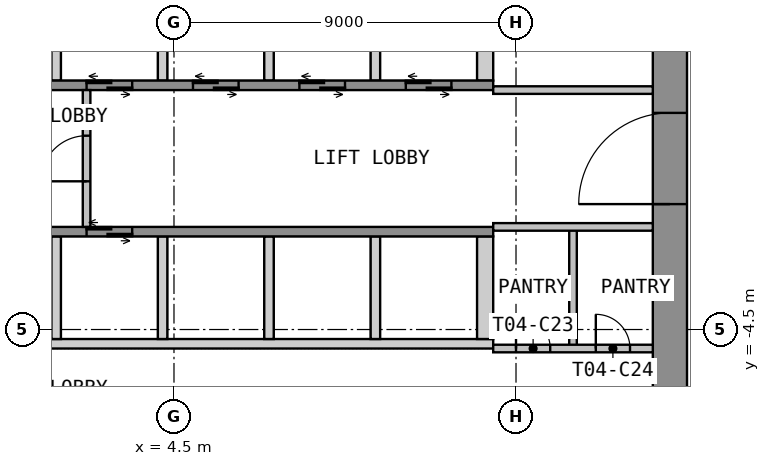
"""IFC4 building model, lengths in metres.
Left out: names, types, materials, properties, quantities, classifications, styles, units other than length and angle.
Written with IfcOpenShell. Run it as: python <this file> out.ifc"""

import sys

from ifc_helpers import new_model, si_unit, direction, frame, frame_2d, origin, place, context, subcontext, project, spatial, polyline, rectangle, outline, extrude, element, fill, save


model = new_model("IFC4")
c1 = context("Model", 3, precision=1e-05, world=origin(), true_north=direction((0.0, 1.0)))
c2 = subcontext(c1, "Body", "Model", "MODEL_VIEW")
j1 = project(units=[si_unit("LENGTHUNIT", "METRE"), si_unit("PLANEANGLEUNIT", "RADIAN")], contexts=[c1])
p1 = place(None, origin())
s1 = spatial("IfcSite", under=j1, at=p1, CompositionType="ELEMENT")
p2 = place(p1, origin())
s2 = spatial("IfcBuilding", under=s1, at=p2, CompositionType="ELEMENT")
p3 = place(p2, frame((0.0, 0.0, 65.1)))
s3 = spatial("IfcBuildingStorey", under=s2, at=p3, CompositionType="ELEMENT", Elevation=65.1)
p4 = place(p3, frame((17.55, -12.6, 0.0), z_axis=(0.0, 0.0, 1.0), x_axis=(0.0, 1.0, 0.0)))
e1 = element("IfcWall", 1, at=p4, inside=s3, PredefinedType="SHEAR", context=c2, shape_type="SweptSolid", body=[
    extrude(rectangle(XDim=25.2, YDim=0.9, at=frame_2d((12.6, 0.0))), origin(), (0.0, 0.0, 1.0), 3.525),
])
p5 = place(p4, frame((11.4, 0.0, 0.0)))
e2 = element("IfcOpeningElement", 2, at=p5, cuts=e1, PredefinedType="OPENING", context=c2, shape_type="SweptSolid", body=[
    extrude(rectangle(XDim=2.4, YDim=2.1, at=frame_2d((1.2, 1.05))), frame((0.0, 0.46, 0.0), z_axis=(0.0, -1.0, 0.0), x_axis=(1.0, 0.0, 0.0)), (0.0, 0.0, 1.0), 0.92),
])
p6 = place(p3, origin())
e3 = element("IfcWall", 3, at=p6, inside=s3, PredefinedType="SHEAR", context=c2, shape_type="SweptSolid", body=[
    extrude(outline(polyline([(1.275, 2.05), (1.525, 2.05), (1.525, 4.75), (1.275, 4.75), (1.275, 2.05)])), origin(), (0.0, 0.0, 1.0), 3.525),
])
p7 = place(p3, origin())
e4 = element("IfcWall", 4, at=p7, inside=s3, PredefinedType="SHEAR", context=c2, shape_type="SweptSolid", body=[
    extrude(outline(polyline([(4.075, 2.05), (4.325, 2.05), (4.325, 4.75), (4.075, 4.75), (4.075, 2.05)])), origin(), (0.0, 0.0, 1.0), 3.525),
])
p8 = place(p3, origin())
e5 = element("IfcWall", 5, at=p8, inside=s3, PredefinedType="SHEAR", context=c2, shape_type="SweptSolid", body=[
    extrude(outline(polyline([(6.875, 2.05), (7.125, 2.05), (7.125, 4.75), (6.875, 4.75), (6.875, 2.05)])), origin(), (0.0, 0.0, 1.0), 3.525),
])
p9 = place(p3, origin())
e6 = element("IfcWall", 6, at=p9, inside=s3, PredefinedType="SHEAR", context=c2, shape_type="SweptSolid", body=[
    extrude(outline(polyline([(9.675, 2.05), (9.925, 2.05), (9.925, 4.75), (9.675, 4.75), (9.675, 2.05)])), origin(), (0.0, 0.0, 1.0), 3.525),
])
p10 = place(p3, origin())
e7 = element("IfcWall", 7, at=p10, inside=s3, PredefinedType="SHEAR", context=c2, shape_type="SweptSolid", body=[
    extrude(outline(polyline([(12.475, 2.05), (12.9, 2.05), (12.9, 4.75), (12.475, 4.75), (12.475, 2.05)])), origin(), (0.0, 0.0, 1.0), 3.525),
])
p11 = place(p3, frame((-12.9, 1.925, 0.0), z_axis=(0.0, 0.0, 1.0), x_axis=(1.0, 0.0, 0.0)))
e8 = element("IfcWall", 8, at=p11, inside=s3, PredefinedType="SHEAR", context=c2, shape_type="SweptSolid", body=[
    extrude(rectangle(XDim=25.8, YDim=0.25, at=frame_2d((12.9, 0.0))), origin(), (0.0, 0.0, 1.0), 3.525),
])
p12 = place(p11, frame((9.5, 0.0, 0.0)))
e9 = element("IfcOpeningElement", 9, at=p12, cuts=e8, PredefinedType="OPENING", context=c2, shape_type="SweptSolid", body=[
    extrude(rectangle(XDim=1.2, YDim=2.1, at=frame_2d((0.6, 1.05))), frame((0.0, 0.135, 0.0), z_axis=(0.0, -1.0, 0.0), x_axis=(1.0, 0.0, 0.0)), (0.0, 0.0, 1.0), 0.27),
])
p13 = place(p11, frame((12.3, 0.0, 0.0)))
e10 = element("IfcOpeningElement", 10, at=p13, cuts=e8, PredefinedType="OPENING", context=c2, shape_type="SweptSolid", body=[
    extrude(rectangle(XDim=1.2, YDim=2.1, at=frame_2d((0.6, 1.05))), frame((0.0, 0.135, 0.0), z_axis=(0.0, -1.0, 0.0), x_axis=(1.0, 0.0, 0.0)), (0.0, 0.0, 1.0), 0.27),
])
p14 = place(p11, frame((15.1, 0.0, 0.0)))
e11 = element("IfcOpeningElement", 11, at=p14, cuts=e8, PredefinedType="OPENING", context=c2, shape_type="SweptSolid", body=[
    extrude(rectangle(XDim=1.2, YDim=2.1, at=frame_2d((0.6, 1.05))), frame((0.0, 0.135, 0.0), z_axis=(0.0, -1.0, 0.0), x_axis=(1.0, 0.0, 0.0)), (0.0, 0.0, 1.0), 0.27),
])
p15 = place(p11, frame((17.9, 0.0, 0.0)))
e12 = element("IfcOpeningElement", 12, at=p15, cuts=e8, PredefinedType="OPENING", context=c2, shape_type="SweptSolid", body=[
    extrude(rectangle(XDim=1.2, YDim=2.1, at=frame_2d((0.6, 1.05))), frame((0.0, 0.135, 0.0), z_axis=(0.0, -1.0, 0.0), x_axis=(1.0, 0.0, 0.0)), (0.0, 0.0, 1.0), 0.27),
])
p16 = place(p11, frame((20.7, 0.0, 0.0)))
e13 = element("IfcOpeningElement", 13, at=p16, cuts=e8, PredefinedType="OPENING", context=c2, shape_type="SweptSolid", body=[
    extrude(rectangle(XDim=1.2, YDim=2.1, at=frame_2d((0.6, 1.05))), frame((0.0, 0.135, 0.0), z_axis=(0.0, -1.0, 0.0), x_axis=(1.0, 0.0, 0.0)), (0.0, 0.0, 1.0), 0.27),
])
p17 = place(p11, frame((23.5, 0.0, 0.0)))
e14 = element("IfcOpeningElement", 14, at=p17, cuts=e8, PredefinedType="OPENING", context=c2, shape_type="SweptSolid", body=[
    extrude(rectangle(XDim=1.2, YDim=2.1, at=frame_2d((0.6, 1.05))), frame((0.0, 0.135, 0.0), z_axis=(0.0, -1.0, 0.0), x_axis=(1.0, 0.0, 0.0)), (0.0, 0.0, 1.0), 0.27),
])
p18 = place(p3, origin())
e15 = element("IfcWall", 15, at=p18, inside=s3, PredefinedType="SHEAR", context=c2, shape_type="SweptSolid", body=[
    extrude(outline(polyline([(-12.9, -5.0), (12.9, -5.0), (12.9, -4.75), (-12.9, -4.75), (-12.9, -5.0)])), origin(), (0.0, 0.0, 1.0), 3.525),
])
p19 = place(p3, origin())
e16 = element("IfcWall", 16, at=p19, inside=s3, PredefinedType="SHEAR", context=c2, shape_type="SweptSolid", body=[
    extrude(outline(polyline([(1.275, -4.75), (1.525, -4.75), (1.525, -2.05), (1.275, -2.05), (1.275, -4.75)])), origin(), (0.0, 0.0, 1.0), 3.525),
])
p20 = place(p3, origin())
e17 = element("IfcWall", 17, at=p20, inside=s3, PredefinedType="SHEAR", context=c2, shape_type="SweptSolid", body=[
    extrude(outline(polyline([(4.075, -4.75), (4.325, -4.75), (4.325, -2.05), (4.075, -2.05), (4.075, -4.75)])), origin(), (0.0, 0.0, 1.0), 3.525),
])
p21 = place(p3, origin())
e18 = element("IfcWall", 18, at=p21, inside=s3, PredefinedType="SHEAR", context=c2, shape_type="SweptSolid", body=[
    extrude(outline(polyline([(6.875, -4.75), (7.125, -4.75), (7.125, -2.05), (6.875, -2.05), (6.875, -4.75)])), origin(), (0.0, 0.0, 1.0), 3.525),
])
p22 = place(p3, origin())
e19 = element("IfcWall", 19, at=p22, inside=s3, PredefinedType="SHEAR", context=c2, shape_type="SweptSolid", body=[
    extrude(outline(polyline([(9.675, -4.75), (9.925, -4.75), (9.925, -2.05), (9.675, -2.05), (9.675, -4.75)])), origin(), (0.0, 0.0, 1.0), 3.525),
])
p23 = place(p3, origin())
e20 = element("IfcWall", 20, at=p23, inside=s3, PredefinedType="SHEAR", context=c2, shape_type="SweptSolid", body=[
    extrude(outline(polyline([(12.475, -4.75), (12.9, -4.75), (12.9, -2.05), (12.475, -2.05), (12.475, -4.75)])), origin(), (0.0, 0.0, 1.0), 3.525),
])
p24 = place(p3, frame((-12.9, -1.925, 0.0), z_axis=(0.0, 0.0, 1.0), x_axis=(1.0, 0.0, 0.0)))
e21 = element("IfcWall", 21, at=p24, inside=s3, PredefinedType="SHEAR", context=c2, shape_type="SweptSolid", body=[
    extrude(rectangle(XDim=25.8, YDim=0.25, at=frame_2d((12.9, 0.0))), origin(), (0.0, 0.0, 1.0), 3.525),
])
p25 = place(p24, frame((1.1, 0.0, 0.0)))
e22 = element("IfcOpeningElement", 22, at=p25, cuts=e21, PredefinedType="OPENING", context=c2, shape_type="SweptSolid", body=[
    extrude(rectangle(XDim=1.2, YDim=2.1, at=frame_2d((0.6, 1.05))), frame((0.0, 0.135, 0.0), z_axis=(0.0, -1.0, 0.0), x_axis=(1.0, 0.0, 0.0)), (0.0, 0.0, 1.0), 0.27),
])
p26 = place(p24, frame((3.9, 0.0, 0.0)))
e23 = element("IfcOpeningElement", 23, at=p26, cuts=e21, PredefinedType="OPENING", context=c2, shape_type="SweptSolid", body=[
    extrude(rectangle(XDim=1.2, YDim=2.1, at=frame_2d((0.6, 1.05))), frame((0.0, 0.135, 0.0), z_axis=(0.0, -1.0, 0.0), x_axis=(1.0, 0.0, 0.0)), (0.0, 0.0, 1.0), 0.27),
])
p27 = place(p24, frame((6.7, 0.0, 0.0)))
e24 = element("IfcOpeningElement", 24, at=p27, cuts=e21, PredefinedType="OPENING", context=c2, shape_type="SweptSolid", body=[
    extrude(rectangle(XDim=1.2, YDim=2.1, at=frame_2d((0.6, 1.05))), frame((0.0, 0.135, 0.0), z_axis=(0.0, -1.0, 0.0), x_axis=(1.0, 0.0, 0.0)), (0.0, 0.0, 1.0), 0.27),
])
p28 = place(p24, frame((9.5, 0.0, 0.0)))
e25 = element("IfcOpeningElement", 25, at=p28, cuts=e21, PredefinedType="OPENING", context=c2, shape_type="SweptSolid", body=[
    extrude(rectangle(XDim=1.2, YDim=2.1, at=frame_2d((0.6, 1.05))), frame((0.0, 0.135, 0.0), z_axis=(0.0, -1.0, 0.0), x_axis=(1.0, 0.0, 0.0)), (0.0, 0.0, 1.0), 0.27),
])
p29 = place(p24, frame((12.3, 0.0, 0.0)))
e26 = element("IfcOpeningElement", 26, at=p29, cuts=e21, PredefinedType="OPENING", context=c2, shape_type="SweptSolid", body=[
    extrude(rectangle(XDim=1.2, YDim=2.1, at=frame_2d((0.6, 1.05))), frame((0.0, 0.135, 0.0), z_axis=(0.0, -1.0, 0.0), x_axis=(1.0, 0.0, 0.0)), (0.0, 0.0, 1.0), 0.27),
])
p30 = place(p24, frame((15.1, 0.0, 0.0)))
e27 = element("IfcOpeningElement", 27, at=p30, cuts=e21, PredefinedType="OPENING", context=c2, shape_type="SweptSolid", body=[
    extrude(rectangle(XDim=1.2, YDim=2.1, at=frame_2d((0.6, 1.05))), frame((0.0, 0.135, 0.0), z_axis=(0.0, -1.0, 0.0), x_axis=(1.0, 0.0, 0.0)), (0.0, 0.0, 1.0), 0.27),
])
p31 = place(p3, frame((2.2, -1.8, 0.0), z_axis=(0.0, 0.0, 1.0), x_axis=(0.0, 1.0, 0.0)))
e28 = element("IfcWall", 28, at=p31, inside=s3, PredefinedType="PARTITIONING", context=c2, shape_type="SweptSolid", body=[
    extrude(rectangle(XDim=3.6, YDim=0.2, at=frame_2d((1.8, 0.0))), origin(), (0.0, 0.0, 1.0), 3.525),
])
p32 = place(p31, frame((1.2, 0.0, 0.0)))
e29 = element("IfcOpeningElement", 29, at=p32, cuts=e28, PredefinedType="OPENING", context=c2, shape_type="SweptSolid", body=[
    extrude(rectangle(XDim=1.2, YDim=2.1, at=frame_2d((0.6, 1.05))), frame((0.0, 0.11, 0.0), z_axis=(0.0, -1.0, 0.0), x_axis=(1.0, 0.0, 0.0)), (0.0, 0.0, 1.0), 0.22),
])
p33 = place(p3, frame((12.9, 1.8, 0.0), z_axis=(0.0, 0.0, 1.0), x_axis=(1.0, 0.0, 0.0)))
e30 = element("IfcWall", 30, at=p33, inside=s3, PredefinedType="PARTITIONING", context=c2, shape_type="SweptSolid", body=[
    extrude(rectangle(XDim=4.2, YDim=0.2, at=frame_2d((2.1, 0.0))), origin(), (0.0, 0.0, 1.0), 3.525),
])
p34 = place(p3, frame((15.0, -5.0, 0.0), z_axis=(0.0, 0.0, 1.0), x_axis=(0.0, 1.0, 0.0)))
e31 = element("IfcWall", 31, at=p34, inside=s3, PredefinedType="PARTITIONING", context=c2, shape_type="SweptSolid", body=[
    extrude(rectangle(XDim=3.2, YDim=0.2, at=frame_2d((1.6, 0.0))), origin(), (0.0, 0.0, 1.0), 3.525),
])
p35 = place(p3, frame((12.9, -5.0, 0.0), z_axis=(0.0, 0.0, 1.0), x_axis=(1.0, 0.0, 0.0)))
e32 = element("IfcWall", 32, at=p35, inside=s3, PredefinedType="PARTITIONING", context=c2, shape_type="SweptSolid", body=[
    extrude(rectangle(XDim=4.2, YDim=0.2, at=frame_2d((2.1, 0.0))), origin(), (0.0, 0.0, 1.0), 3.525),
])
p36 = place(p35, frame((0.6, 0.0, 0.0)))
e33 = element("IfcOpeningElement", 33, at=p36, cuts=e32, PredefinedType="OPENING", context=c2, shape_type="SweptSolid", body=[
    extrude(rectangle(XDim=0.9, YDim=2.1, at=frame_2d((0.45, 1.05))), frame((0.0, 0.11, 0.0), z_axis=(0.0, -1.0, 0.0), x_axis=(1.0, 0.0, 0.0)), (0.0, 0.0, 1.0), 0.22),
])
p37 = place(p35, frame((2.7, 0.0, 0.0)))
e34 = element("IfcOpeningElement", 34, at=p37, cuts=e32, PredefinedType="OPENING", context=c2, shape_type="SweptSolid", body=[
    extrude(rectangle(XDim=0.9, YDim=2.1, at=frame_2d((0.45, 1.05))), frame((0.0, 0.11, 0.0), z_axis=(0.0, -1.0, 0.0), x_axis=(1.0, 0.0, 0.0)), (0.0, 0.0, 1.0), 0.22),
])
p38 = place(p3, frame((12.9, -1.8, 0.0), z_axis=(0.0, 0.0, 1.0), x_axis=(1.0, 0.0, 0.0)))
e35 = element("IfcWall", 35, at=p38, inside=s3, PredefinedType="PARTITIONING", context=c2, shape_type="SweptSolid", body=[
    extrude(rectangle(XDim=4.2, YDim=0.2, at=frame_2d((2.1, 0.0))), origin(), (0.0, 0.0, 1.0), 3.525),
])
p39 = place(p5, origin())
e36 = element("IfcDoor", 36, at=p39, inside=s3, OperationType="DOUBLE_DOOR_DOUBLE_SWING", PredefinedType="DOOR", context=c2, shape_type="SweptSolid", body=[
    extrude(rectangle(XDim=2.4, YDim=2.1, at=frame_2d((1.2, 1.05))), frame((0.0, 0.025, 0.0), z_axis=(0.0, -1.0, 0.0), x_axis=(1.0, 0.0, 0.0)), (0.0, 0.0, 1.0), 0.05),
])
fill(e2, e36)
p40 = place(p14, origin())
e37 = element("IfcDoor", 37, at=p40, inside=s3, OperationType="DOUBLE_DOOR_SLIDING", PredefinedType="DOOR", context=c2, shape_type="SweptSolid", body=[
    extrude(rectangle(XDim=1.2, YDim=2.1, at=frame_2d((0.6, 1.05))), frame((0.0, 0.025, 0.0), z_axis=(0.0, -1.0, 0.0), x_axis=(1.0, 0.0, 0.0)), (0.0, 0.0, 1.0), 0.05),
])
fill(e11, e37)
p41 = place(p15, origin())
e38 = element("IfcDoor", 38, at=p41, inside=s3, OperationType="DOUBLE_DOOR_SLIDING", PredefinedType="DOOR", context=c2, shape_type="SweptSolid", body=[
    extrude(rectangle(XDim=1.2, YDim=2.1, at=frame_2d((0.6, 1.05))), frame((0.0, 0.025, 0.0), z_axis=(0.0, -1.0, 0.0), x_axis=(1.0, 0.0, 0.0)), (0.0, 0.0, 1.0), 0.05),
])
fill(e12, e38)
p42 = place(p16, origin())
e39 = element("IfcDoor", 39, at=p42, inside=s3, OperationType="DOUBLE_DOOR_SLIDING", PredefinedType="DOOR", context=c2, shape_type="SweptSolid", body=[
    extrude(rectangle(XDim=1.2, YDim=2.1, at=frame_2d((0.6, 1.05))), frame((0.0, 0.025, 0.0), z_axis=(0.0, -1.0, 0.0), x_axis=(1.0, 0.0, 0.0)), (0.0, 0.0, 1.0), 0.05),
])
fill(e13, e39)
p43 = place(p17, origin())
e40 = element("IfcDoor", 40, at=p43, inside=s3, OperationType="DOUBLE_DOOR_SLIDING", PredefinedType="DOOR", context=c2, shape_type="SweptSolid", body=[
    extrude(rectangle(XDim=1.2, YDim=2.1, at=frame_2d((0.6, 1.05))), frame((0.0, 0.025, 0.0), z_axis=(0.0, -1.0, 0.0), x_axis=(1.0, 0.0, 0.0)), (0.0, 0.0, 1.0), 0.05),
])
fill(e14, e40)
p44 = place(p30, origin())
e41 = element("IfcDoor", 41, at=p44, inside=s3, OperationType="DOUBLE_DOOR_SLIDING", PredefinedType="DOOR", context=c2, shape_type="SweptSolid", body=[
    extrude(rectangle(XDim=1.2, YDim=2.1, at=frame_2d((0.6, 1.05))), frame((0.0, 0.025, 0.0), z_axis=(0.0, -1.0, 0.0), x_axis=(1.0, 0.0, 0.0)), (0.0, 0.0, 1.0), 0.05),
])
fill(e27, e41)
p45 = place(p32, origin())
e42 = element("IfcDoor", 42, at=p45, inside=s3, OperationType="SINGLE_SWING_LEFT", PredefinedType="DOOR", context=c2, shape_type="SweptSolid", body=[
    extrude(rectangle(XDim=1.2, YDim=2.1, at=frame_2d((0.6, 1.05))), frame((0.0, 0.025, 0.0), z_axis=(0.0, -1.0, 0.0), x_axis=(1.0, 0.0, 0.0)), (0.0, 0.0, 1.0), 0.05),
])
fill(e29, e42)
p46 = place(p36, origin())
e43 = element("IfcDoor", 43, at=p46, inside=s3, OperationType="SINGLE_SWING_LEFT", PredefinedType="DOOR", context=c2, shape_type="SweptSolid", body=[
    extrude(rectangle(XDim=0.9, YDim=2.1, at=frame_2d((0.45, 1.05))), frame((0.0, 0.025, 0.0), z_axis=(0.0, -1.0, 0.0), x_axis=(1.0, 0.0, 0.0)), (0.0, 0.0, 1.0), 0.05),
])
fill(e33, e43)
p47 = place(p37, origin())
e44 = element("IfcDoor", 44, at=p47, inside=s3, OperationType="SINGLE_SWING_LEFT", PredefinedType="DOOR", context=c2, shape_type="SweptSolid", body=[
    extrude(rectangle(XDim=0.9, YDim=2.1, at=frame_2d((0.45, 1.05))), frame((0.0, 0.025, 0.0), z_axis=(0.0, -1.0, 0.0), x_axis=(1.0, 0.0, 0.0)), (0.0, 0.0, 1.0), 0.05),
])
fill(e34, e44)
save(model, sys.argv[1])
